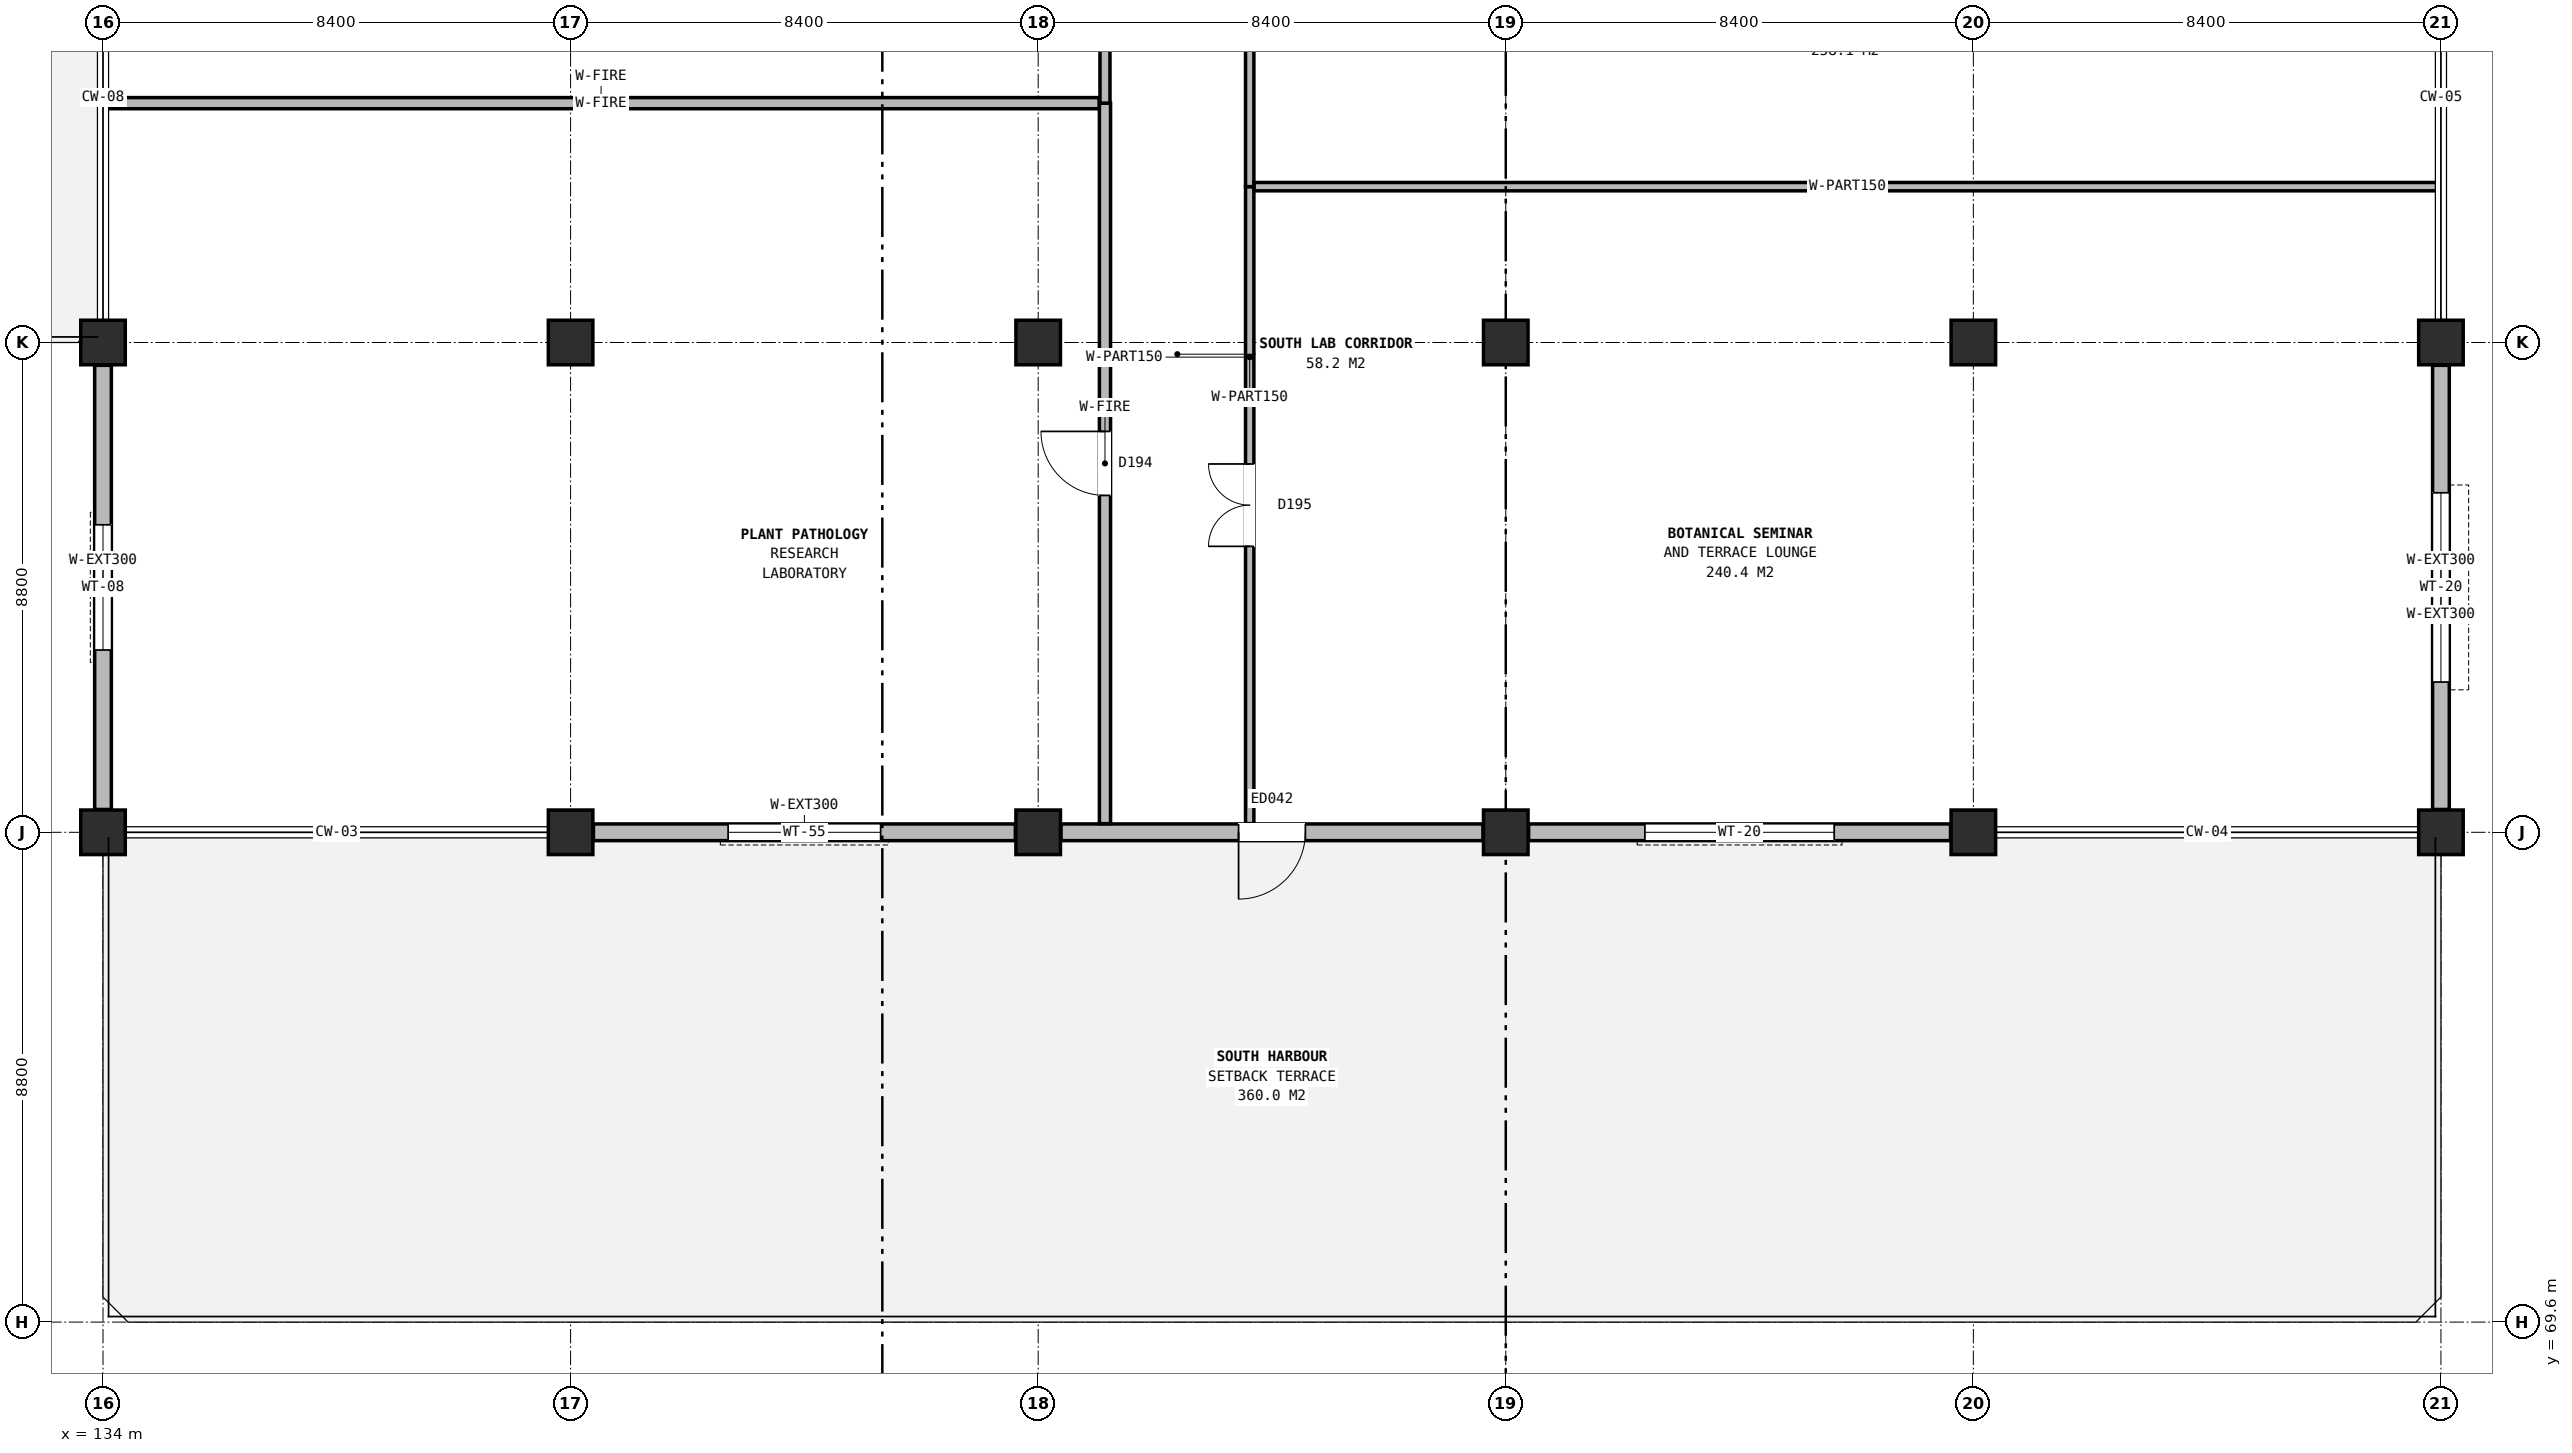
"""IFC4 building model, lengths in metres.
Left out: names, types, materials, properties, quantities, classifications, styles, units other than length and angle.
Written with IfcOpenShell. Run it as: python <this file> out.ifc"""

import sys

from ifc_helpers import new_model, si_unit, direction, frame, frame_2d, origin, origin_2d, place, context, subcontext, project, spatial, rectangle, extrude, element, fill, save


model = new_model("IFC4")
c1 = context("Model", 3, precision=1e-05, world=origin(), true_north=direction((0.0, 1.0)))
c2 = subcontext(c1, "Body", "Model", "MODEL_VIEW")
j1 = project(units=[si_unit("LENGTHUNIT", "METRE"), si_unit("PLANEANGLEUNIT", "RADIAN")], contexts=[c1])
p1 = place(None, origin())
s1 = spatial("IfcSite", under=j1, at=p1, CompositionType="ELEMENT")
p2 = place(p1, origin())
s2 = spatial("IfcBuilding", under=s1, at=p2, CompositionType="ELEMENT")
p3 = place(p2, frame((0.0, 0.0, 13.2)))
s3 = spatial("IfcBuildingStorey", under=s2, at=p3, CompositionType="ELEMENT", Elevation=13.2)
for number, where, z_axis, x_axis in (
    (1, (134.0, 78.4, 0.0), (0.0, 0.0, 1.0), (1.0, 0.0, 0.0)),
    (2, (134.0, 87.2, 0.0), (0.0, 0.0, 1.0), (1.0, 0.0, 0.0)),
    (3, (142.4, 78.4, 0.0), (0.0, 0.0, 1.0), (1.0, 0.0, 0.0)),
    (4, (142.4, 87.2, 0.0), (0.0, 0.0, 1.0), (1.0, 0.0, 0.0)),
    (5, (150.8, 78.4, 0.0), (0.0, 0.0, 1.0), (1.0, 0.0, 0.0)),
    (6, (150.8, 87.2, 0.0), (0.0, 0.0, 1.0), (1.0, 0.0, 0.0)),
    (7, (159.2, 78.4, 0.0), (0.0, 0.0, 1.0), (1.0, 0.0, 0.0)),
    (8, (159.2, 87.2, 0.0), (0.0, 0.0, 1.0), (1.0, 0.0, 0.0)),
    (9, (167.6, 78.4, 0.0), (0.0, 0.0, 1.0), (1.0, 0.0, 0.0)),
    (10, (167.6, 87.2, 0.0), (0.0, 0.0, 1.0), (1.0, 0.0, 0.0)),
    (11, (176.0, 78.4, 0.0), (0.0, 0.0, 1.0), (1.0, 0.0, 0.0)),
    (12, (176.0, 87.2, 0.0), (0.0, 0.0, 1.0), (1.0, 0.0, 0.0)),
):
    element("IfcColumn", number, at=place(p3, frame(where, z_axis=z_axis, x_axis=x_axis)), inside=s3, PredefinedType="COLUMN", context=c2, shape_type="SweptSolid", body=[
        extrude(rectangle(XDim=0.8, YDim=0.8, at=origin_2d()), origin(), (0.0, 0.0, 1.0), 4.0),
    ])
p4 = place(p3, frame((142.81, 78.4, 0.0), z_axis=(0.0, 0.0, 1.0), x_axis=(1.0, 0.0, 0.0)))
e13 = element("IfcWall", 13, at=p4, inside=s3, PredefinedType="SOLIDWALL", context=c2, shape_type="SweptSolid", body=[
    extrude(rectangle(XDim=7.58, YDim=0.3, at=frame_2d((3.79, 0.0))), origin(), (0.0, 0.0, 1.0), 3.25),
])
p5 = place(p4, frame((2.42, 0.0, 0.9)))
e14 = element("IfcOpeningElement", 14, at=p5, cuts=e13, PredefinedType="OPENING", context=c2, shape_type="SweptSolid", body=[
    extrude(rectangle(XDim=2.74, YDim=2.2, at=frame_2d((1.37, 1.1))), frame((0.0, 0.16, 0.0), z_axis=(0.0, -1.0, 0.0), x_axis=(1.0, 0.0, 0.0)), (0.0, 0.0, 1.0), 0.32),
])
p6 = place(p3, frame((151.21, 78.4, 0.0), z_axis=(0.0, 0.0, 1.0), x_axis=(1.0, 0.0, 0.0)))
e15 = element("IfcWall", 15, at=p6, inside=s3, PredefinedType="SOLIDWALL", context=c2, shape_type="SweptSolid", body=[
    extrude(rectangle(XDim=7.58, YDim=0.3, at=frame_2d((3.79, 0.0))), origin(), (0.0, 0.0, 1.0), 3.25),
])
p7 = place(p6, frame((3.19, 0.0, 0.0)))
e16 = element("IfcOpeningElement", 16, at=p7, cuts=e15, PredefinedType="OPENING", context=c2, shape_type="SweptSolid", body=[
    extrude(rectangle(XDim=1.2, YDim=2.25, at=frame_2d((0.6, 1.125))), frame((0.0, 0.16, 0.0), z_axis=(0.0, -1.0, 0.0), x_axis=(1.0, 0.0, 0.0)), (0.0, 0.0, 1.0), 0.32),
])
p8 = place(p3, frame((159.61, 78.4, 0.0), z_axis=(0.0, 0.0, 1.0), x_axis=(1.0, 0.0, 0.0)))
e17 = element("IfcWall", 17, at=p8, inside=s3, PredefinedType="SOLIDWALL", context=c2, shape_type="SweptSolid", body=[
    extrude(rectangle(XDim=7.58, YDim=0.3, at=frame_2d((3.79, 0.0))), origin(), (0.0, 0.0, 1.0), 3.25),
])
p9 = place(p8, frame((2.09, 0.0, 0.9)))
e18 = element("IfcOpeningElement", 18, at=p9, cuts=e17, PredefinedType="OPENING", context=c2, shape_type="SweptSolid", body=[
    extrude(rectangle(XDim=3.4, YDim=2.15, at=frame_2d((1.7, 1.075))), frame((0.0, 0.16, 0.0), z_axis=(0.0, -1.0, 0.0), x_axis=(1.0, 0.0, 0.0)), (0.0, 0.0, 1.0), 0.32),
])
p10 = place(p3, frame((176.0, 78.81, 0.0), z_axis=(0.0, 0.0, 1.0), x_axis=(0.0, 1.0, 0.0)))
e19 = element("IfcWall", 19, at=p10, inside=s3, PredefinedType="SOLIDWALL", context=c2, shape_type="SweptSolid", body=[
    extrude(rectangle(XDim=7.98, YDim=0.3, at=frame_2d((3.99, 0.0))), origin(), (0.0, 0.0, 1.0), 3.25),
])
p11 = place(p10, frame((2.29, 0.0, 0.9)))
e20 = element("IfcOpeningElement", 20, at=p11, cuts=e19, PredefinedType="OPENING", context=c2, shape_type="SweptSolid", body=[
    extrude(rectangle(XDim=3.4, YDim=2.15, at=frame_2d((1.7, 1.075))), frame((0.0, 0.16, 0.0), z_axis=(0.0, -1.0, 0.0), x_axis=(1.0, 0.0, 0.0)), (0.0, 0.0, 1.0), 0.32),
])
p12 = place(p3, frame((134.0, 86.79, 0.0), z_axis=(0.0, 0.0, 1.0), x_axis=(0.0, -1.0, 0.0)))
e21 = element("IfcWall", 21, at=p12, inside=s3, PredefinedType="SOLIDWALL", context=c2, shape_type="SweptSolid", body=[
    extrude(rectangle(XDim=7.98, YDim=0.3, at=frame_2d((3.99, 0.0))), origin(), (0.0, 0.0, 1.0), 3.25),
])
p13 = place(p12, frame((2.865, 0.0, 0.9)))
e22 = element("IfcOpeningElement", 22, at=p13, cuts=e21, PredefinedType="OPENING", context=c2, shape_type="SweptSolid", body=[
    extrude(rectangle(XDim=2.25, YDim=1.95, at=frame_2d((1.125, 0.975))), frame((0.0, 0.16, 0.0), z_axis=(0.0, -1.0, 0.0), x_axis=(1.0, 0.0, 0.0)), (0.0, 0.0, 1.0), 0.32),
])
p14 = place(p3, frame((152.0, 78.555, 0.0), z_axis=(0.0, 0.0, 1.0), x_axis=(0.0, 1.0, 0.0)))
e23 = element("IfcWall", 23, at=p14, inside=s3, PredefinedType="PARTITIONING", context=c2, shape_type="SweptSolid", body=[
    extrude(rectangle(XDim=12.945, YDim=0.2, at=frame_2d((6.473, 0.0))), origin(), (0.0, 0.0, 1.0), 3.665),
])
p15 = place(p14, frame((5.897, 0.0, 0.0)))
e24 = element("IfcOpeningElement", 24, at=p15, cuts=e23, PredefinedType="OPENING", context=c2, shape_type="SweptSolid", body=[
    extrude(rectangle(XDim=1.15, YDim=2.2, at=frame_2d((0.575, 1.1))), frame((0.0, 0.11, 0.0), z_axis=(0.0, -1.0, 0.0), x_axis=(1.0, 0.0, 0.0)), (0.0, 0.0, 1.0), 0.22),
])
p16 = place(p3, frame((152.0, 91.5, 0.0), z_axis=(0.0, 0.0, 1.0), x_axis=(0.0, 1.0, 0.0)))
e25 = element("IfcWall", 25, at=p16, inside=s3, PredefinedType="PARTITIONING", context=c2, shape_type="SweptSolid", body=[
    extrude(rectangle(XDim=10.805, YDim=0.18, at=frame_2d((5.402, 0.0))), origin(), (0.0, 0.0, 1.0), 3.665),
])
p17 = place(p3, frame((154.6, 78.555, 0.0), z_axis=(0.0, 0.0, 1.0), x_axis=(0.0, 1.0, 0.0)))
e26 = element("IfcWall", 26, at=p17, inside=s3, PredefinedType="PARTITIONING", context=c2, shape_type="SweptSolid", body=[
    extrude(rectangle(XDim=11.445, YDim=0.15, at=frame_2d((5.723, 0.0))), origin(), (0.0, 0.0, 1.0), 3.665),
])
p18 = place(p17, frame((4.982, 0.0, 0.0)))
e27 = element("IfcOpeningElement", 27, at=p18, cuts=e26, PredefinedType="OPENING", context=c2, shape_type="SweptSolid", body=[
    extrude(rectangle(XDim=1.48, YDim=2.2, at=frame_2d((0.74, 1.1))), frame((0.0, 0.085, 0.0), z_axis=(0.0, -1.0, 0.0), x_axis=(1.0, 0.0, 0.0)), (0.0, 0.0, 1.0), 0.17),
])
p19 = place(p3, frame((154.6, 90.0, 0.0), z_axis=(0.0, 0.0, 1.0), x_axis=(0.0, 1.0, 0.0)))
e28 = element("IfcWall", 28, at=p19, inside=s3, PredefinedType="PARTITIONING", context=c2, shape_type="SweptSolid", body=[
    extrude(rectangle(XDim=12.32, YDim=0.15, at=frame_2d((6.16, 0.0))), origin(), (0.0, 0.0, 1.0), 3.665),
])
p20 = place(p3, frame((134.0, 91.5, 0.0), z_axis=(0.0, 0.0, 1.0), x_axis=(1.0, 0.0, 0.0)))
e29 = element("IfcWall", 29, at=p20, inside=s3, PredefinedType="PARTITIONING", context=c2, shape_type="SweptSolid", body=[
    extrude(rectangle(XDim=17.895, YDim=0.2, at=frame_2d((8.948, 0.0))), origin(), (0.0, 0.0, 1.0), 3.575),
])
p21 = place(p3, frame((154.68, 90.0, 0.0), z_axis=(0.0, 0.0, 1.0), x_axis=(1.0, 0.0, 0.0)))
e30 = element("IfcWall", 30, at=p21, inside=s3, PredefinedType="PARTITIONING", context=c2, shape_type="SweptSolid", body=[
    extrude(rectangle(XDim=21.32, YDim=0.15, at=frame_2d((10.66, 0.0))), origin(), (0.0, 0.0, 1.0), 3.665),
])
p22 = place(p5, origin())
e31 = element("IfcWindow", 31, at=p22, inside=s3, PartitioningType="SINGLE_PANEL", PredefinedType="WINDOW", context=c2, shape_type="SweptSolid", body=[
    extrude(rectangle(XDim=2.74, YDim=2.2, at=frame_2d((1.37, 1.1))), frame((0.0, 0.03, 0.0), z_axis=(0.0, -1.0, 0.0), x_axis=(1.0, 0.0, 0.0)), (0.0, 0.0, 1.0), 0.06),
])
fill(e14, e31)
p23 = place(p7, frame((1.2, 0.0, 0.0), z_axis=(0.0, 0.0, 1.0), x_axis=(-1.0, 0.0, 0.0)))
e32 = element("IfcDoor", 32, at=p23, inside=s3, OperationType="SINGLE_SWING_LEFT", PredefinedType="DOOR", context=c2, shape_type="SweptSolid", body=[
    extrude(rectangle(XDim=1.2, YDim=2.25, at=frame_2d((0.6, 1.125))), frame((0.0, 0.025, 0.0), z_axis=(0.0, -1.0, 0.0), x_axis=(1.0, 0.0, 0.0)), (0.0, 0.0, 1.0), 0.05),
])
fill(e16, e32)
p24 = place(p9, origin())
e33 = element("IfcWindow", 33, at=p24, inside=s3, PartitioningType="SINGLE_PANEL", PredefinedType="WINDOW", context=c2, shape_type="SweptSolid", body=[
    extrude(rectangle(XDim=3.4, YDim=2.15, at=frame_2d((1.7, 1.075))), frame((0.0, 0.03, 0.0), z_axis=(0.0, -1.0, 0.0), x_axis=(1.0, 0.0, 0.0)), (0.0, 0.0, 1.0), 0.06),
])
fill(e18, e33)
p25 = place(p11, origin())
e34 = element("IfcWindow", 34, at=p25, inside=s3, PartitioningType="SINGLE_PANEL", PredefinedType="WINDOW", context=c2, shape_type="SweptSolid", body=[
    extrude(rectangle(XDim=3.4, YDim=2.15, at=frame_2d((1.7, 1.075))), frame((0.0, 0.03, 0.0), z_axis=(0.0, -1.0, 0.0), x_axis=(1.0, 0.0, 0.0)), (0.0, 0.0, 1.0), 0.06),
])
fill(e20, e34)
p26 = place(p13, origin())
e35 = element("IfcWindow", 35, at=p26, inside=s3, PartitioningType="SINGLE_PANEL", PredefinedType="WINDOW", context=c2, shape_type="SweptSolid", body=[
    extrude(rectangle(XDim=2.25, YDim=1.95, at=frame_2d((1.125, 0.975))), frame((0.0, 0.03, 0.0), z_axis=(0.0, -1.0, 0.0), x_axis=(1.0, 0.0, 0.0)), (0.0, 0.0, 1.0), 0.06),
])
fill(e22, e35)
p27 = place(p15, origin())
e36 = element("IfcDoor", 36, at=p27, inside=s3, OperationType="SINGLE_SWING_RIGHT", PredefinedType="DOOR", context=c2, shape_type="SweptSolid", body=[
    extrude(rectangle(XDim=1.15, YDim=2.2, at=frame_2d((0.575, 1.1))), frame((0.0, 0.025, 0.0), z_axis=(0.0, -1.0, 0.0), x_axis=(1.0, 0.0, 0.0)), (0.0, 0.0, 1.0), 0.05),
])
fill(e24, e36)
p28 = place(p18, origin())
e37 = element("IfcDoor", 37, at=p28, inside=s3, OperationType="DOUBLE_DOOR_SINGLE_SWING", PredefinedType="DOOR", context=c2, shape_type="SweptSolid", body=[
    extrude(rectangle(XDim=1.48, YDim=2.2, at=frame_2d((0.74, 1.1))), frame((0.0, 0.025, 0.0), z_axis=(0.0, -1.0, 0.0), x_axis=(1.0, 0.0, 0.0)), (0.0, 0.0, 1.0), 0.05),
])
fill(e27, e37)
save(model, sys.argv[1])
